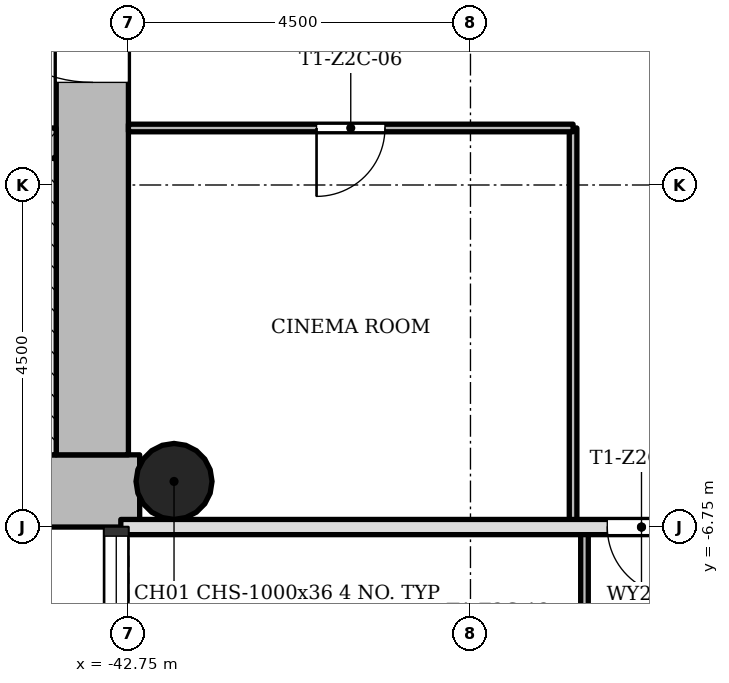
"""IFC4 building model, lengths in metres.
Left out: names, types, materials, properties, quantities, classifications, styles, units other than length and angle.
Written with IfcOpenShell. Run it as: python <this file> out.ifc"""

import sys

from ifc_helpers import new_model, si_unit, direction, frame, frame_2d, origin, origin_2d, place, context, subcontext, project, spatial, rectangle, hollow_circle, extrude, element, fill, save


model = new_model("IFC4")
c1 = context("Model", 3, precision=1e-05, world=origin(), true_north=direction((0.0, 1.0)))
c2 = subcontext(c1, "Body", "Model", "MODEL_VIEW")
j1 = project(units=[si_unit("LENGTHUNIT", "METRE"), si_unit("PLANEANGLEUNIT", "RADIAN")], contexts=[c1])
p1 = place(None, origin())
s1 = spatial("IfcSite", under=j1, at=p1, CompositionType="ELEMENT")
p2 = place(p1, origin())
s2 = spatial("IfcBuilding", under=s1, at=p2, CompositionType="ELEMENT")
p3 = place(p2, frame((0.0, 0.0, 86.8)))
s3 = spatial("IfcBuildingStorey", under=s2, at=p3, CompositionType="ELEMENT", Elevation=86.8)
p4 = place(p3, frame((-51.298, -6.275, 0.0), z_axis=(0.0, 0.0, 1.0), x_axis=(1.0, 0.0, 0.0)))
e1 = element("IfcWall", 1, at=p4, inside=s3, PredefinedType="SHEAR", context=c2, shape_type="SweptSolid", body=[
    extrude(rectangle(XDim=8.696, YDim=0.95, at=frame_2d((4.348, 0.0))), origin(), (0.0, 0.0, 1.0), 3.4),
])
p5 = place(p3, frame((-43.225, -5.8, 0.0), z_axis=(0.0, 0.0, 1.0), x_axis=(0.0, 1.0, 0.0)))
e2 = element("IfcWall", 2, at=p5, inside=s3, PredefinedType="SHEAR", context=c2, shape_type="SweptSolid", body=[
    extrude(rectangle(XDim=12.55, YDim=0.95, at=frame_2d((6.275, 0.0))), origin(), (0.0, 0.0, 1.0), 3.4),
])
p6 = place(p5, frame((4.9, 0.0, 0.0)))
e3 = element("IfcOpeningElement", 3, at=p6, cuts=e2, PredefinedType="OPENING", context=c2, shape_type="SweptSolid", body=[
    extrude(rectangle(XDim=1.8, YDim=2.1, at=frame_2d((0.9, 1.05))), frame((0.0, 0.485, 0.0), z_axis=(0.0, -1.0, 0.0), x_axis=(1.0, 0.0, 0.0)), (0.0, 0.0, 1.0), 0.97),
])
p7 = place(p3, frame((-50.8, -1.7, 0.0), z_axis=(0.0, 0.0, 1.0), x_axis=(1.0, 0.0, 0.0)))
e4 = element("IfcWall", 4, at=p7, inside=s3, PredefinedType="SHEAR", context=c2, shape_type="SweptSolid", body=[
    extrude(rectangle(XDim=7.1, YDim=0.4, at=frame_2d((3.55, 0.0))), origin(), (0.0, 0.0, 1.0), 3.4),
])
p8 = place(p7, frame((5.5, 0.0, 0.0)))
e5 = element("IfcOpeningElement", 5, at=p8, cuts=e4, PredefinedType="OPENING", context=c2, shape_type="SweptSolid", body=[
    extrude(rectangle(XDim=0.9, YDim=2.1, at=frame_2d((0.45, 1.05))), frame((0.0, 0.21, 0.0), z_axis=(0.0, -1.0, 0.0), x_axis=(1.0, 0.0, 0.0)), (0.0, 0.0, 1.0), 0.42),
])
p9 = place(p3, frame((-42.15, -6.15, 0.0), z_axis=(0.0, 0.0, 1.0), x_axis=(1.0, 0.0, 0.0)))
e6 = element("IfcColumn", 6, at=p9, inside=s3, PredefinedType="COLUMN", context=c2, shape_type="SweptSolid", body=[
    extrude(hollow_circle(Radius=0.5, WallThickness=0.036, at=origin_2d()), origin(), (0.0, 0.0, 1.0), 3.4),
])
p10 = place(p3, frame((-36.9, -6.75, 0.0), z_axis=(0.0, 0.0, 1.0), x_axis=(0.0, 1.0, 0.0)))
e7 = element("IfcWall", 7, at=p10, inside=s3, PredefinedType="PARTITIONING", context=c2, shape_type="SweptSolid", body=[
    extrude(rectangle(XDim=5.25, YDim=0.1, at=frame_2d((2.625, 0.0))), origin(), (0.0, 0.0, 1.0), 3.0),
])
p11 = place(p3, frame((-36.75, -14.55, 0.0), z_axis=(0.0, 0.0, 1.0), x_axis=(0.0, 1.0, 0.0)))
e8 = element("IfcWall", 8, at=p11, inside=s3, PredefinedType="PARTITIONING", context=c2, shape_type="SweptSolid", body=[
    extrude(rectangle(XDim=7.8, YDim=0.1, at=frame_2d((3.9, 0.0))), origin(), (0.0, 0.0, 1.0), 3.0),
])
p12 = place(p11, frame((5.1, 0.0, 0.0)))
e9 = element("IfcOpeningElement", 9, at=p12, cuts=e8, PredefinedType="OPENING", context=c2, shape_type="SweptSolid", body=[
    extrude(rectangle(XDim=0.9, YDim=2.1, at=frame_2d((0.45, 1.05))), frame((0.0, 0.06, 0.0), z_axis=(0.0, -1.0, 0.0), x_axis=(1.0, 0.0, 0.0)), (0.0, 0.0, 1.0), 0.12),
])
p13 = place(p11, frame((1.95, 0.0, 0.0)))
e10 = element("IfcOpeningElement", 10, at=p13, cuts=e8, PredefinedType="OPENING", context=c2, shape_type="SweptSolid", body=[
    extrude(rectangle(XDim=0.9, YDim=2.1, at=frame_2d((0.45, 1.05))), frame((0.0, 0.06, 0.0), z_axis=(0.0, -1.0, 0.0), x_axis=(1.0, 0.0, 0.0)), (0.0, 0.0, 1.0), 0.12),
])
p14 = place(p11, frame((0.3, 0.0, 0.0)))
e11 = element("IfcOpeningElement", 11, at=p14, cuts=e8, PredefinedType="OPENING", context=c2, shape_type="SweptSolid", body=[
    extrude(rectangle(XDim=0.9, YDim=2.1, at=frame_2d((0.45, 1.05))), frame((0.0, 0.06, 0.0), z_axis=(0.0, -1.0, 0.0), x_axis=(1.0, 0.0, 0.0)), (0.0, 0.0, 1.0), 0.12),
])
p15 = place(p3, frame((-42.85, -6.75, 0.0), z_axis=(0.0, 0.0, 1.0), x_axis=(1.0, 0.0, 0.0)))
e12 = element("IfcWall", 12, at=p15, inside=s3, PredefinedType="SOLIDWALL", context=c2, shape_type="SweptSolid", body=[
    extrude(rectangle(XDim=13.7, YDim=0.2, at=frame_2d((6.85, 0.0))), origin(), (0.0, 0.0, 1.0), 3.0),
])
p16 = place(p15, frame((6.4, 0.0, 0.0)))
e13 = element("IfcOpeningElement", 13, at=p16, cuts=e12, PredefinedType="OPENING", context=c2, shape_type="SweptSolid", body=[
    extrude(rectangle(XDim=0.9, YDim=2.1, at=frame_2d((0.45, 1.05))), frame((0.0, 0.11, 0.0), z_axis=(0.0, -1.0, 0.0), x_axis=(1.0, 0.0, 0.0)), (0.0, 0.0, 1.0), 0.22),
])
p17 = place(p3, frame((-42.75, -1.5, 0.0), z_axis=(0.0, 0.0, 1.0), x_axis=(1.0, 0.0, 0.0)))
e14 = element("IfcWall", 14, at=p17, inside=s3, PredefinedType="PARTITIONING", context=c2, shape_type="SweptSolid", body=[
    extrude(rectangle(XDim=5.85, YDim=0.1, at=frame_2d((2.925, 0.0))), origin(), (0.0, 0.0, 1.0), 3.0),
])
p18 = place(p17, frame((2.475, 0.0, 0.0)))
e15 = element("IfcOpeningElement", 15, at=p18, cuts=e14, PredefinedType="OPENING", context=c2, shape_type="SweptSolid", body=[
    extrude(rectangle(XDim=0.9, YDim=2.1, at=frame_2d((0.45, 1.05))), frame((0.0, 0.06, 0.0), z_axis=(0.0, -1.0, 0.0), x_axis=(1.0, 0.0, 0.0)), (0.0, 0.0, 1.0), 0.12),
])
p19 = place(p3, frame((-43.825, -1.9, 0.0), z_axis=(0.0, 0.0, 1.0), x_axis=(0.0, -1.0, 0.0)))
e16 = element("IfcWall", 16, at=p19, inside=s3, PredefinedType="SHEAR", context=c2, shape_type="SweptSolid", body=[
    extrude(rectangle(XDim=3.9, YDim=0.25, at=frame_2d((1.95, 0.0))), origin(), (0.0, 0.0, 1.0), 3.4),
])
p20 = place(p18, origin())
e17 = element("IfcDoor", 17, at=p20, inside=s3, OperationType="SINGLE_SWING_LEFT", PredefinedType="DOOR", context=c2, shape_type="SweptSolid", body=[
    extrude(rectangle(XDim=0.9, YDim=2.1, at=frame_2d((0.45, 1.05))), frame((0.0, 0.025, 0.0), z_axis=(0.0, -1.0, 0.0), x_axis=(1.0, 0.0, 0.0)), (0.0, 0.0, 1.0), 0.05),
])
fill(e15, e17)
p21 = place(p16, origin())
e18 = element("IfcDoor", 18, at=p21, inside=s3, OperationType="SINGLE_SWING_RIGHT", PredefinedType="DOOR", context=c2, shape_type="SweptSolid", body=[
    extrude(rectangle(XDim=0.9, YDim=2.1, at=frame_2d((0.45, 1.05))), frame((0.0, 0.025, 0.0), z_axis=(0.0, -1.0, 0.0), x_axis=(1.0, 0.0, 0.0)), (0.0, 0.0, 1.0), 0.05),
])
fill(e13, e18)
p22 = place(p6, origin())
e19 = element("IfcDoor", 19, at=p22, inside=s3, OperationType="SINGLE_SWING_LEFT", PredefinedType="DOOR", context=c2, shape_type="SweptSolid", body=[
    extrude(rectangle(XDim=1.8, YDim=2.1, at=frame_2d((0.9, 1.05))), frame((0.0, 0.025, 0.0), z_axis=(0.0, -1.0, 0.0), x_axis=(1.0, 0.0, 0.0)), (0.0, 0.0, 1.0), 0.05),
])
fill(e3, e19)
save(model, sys.argv[1])
